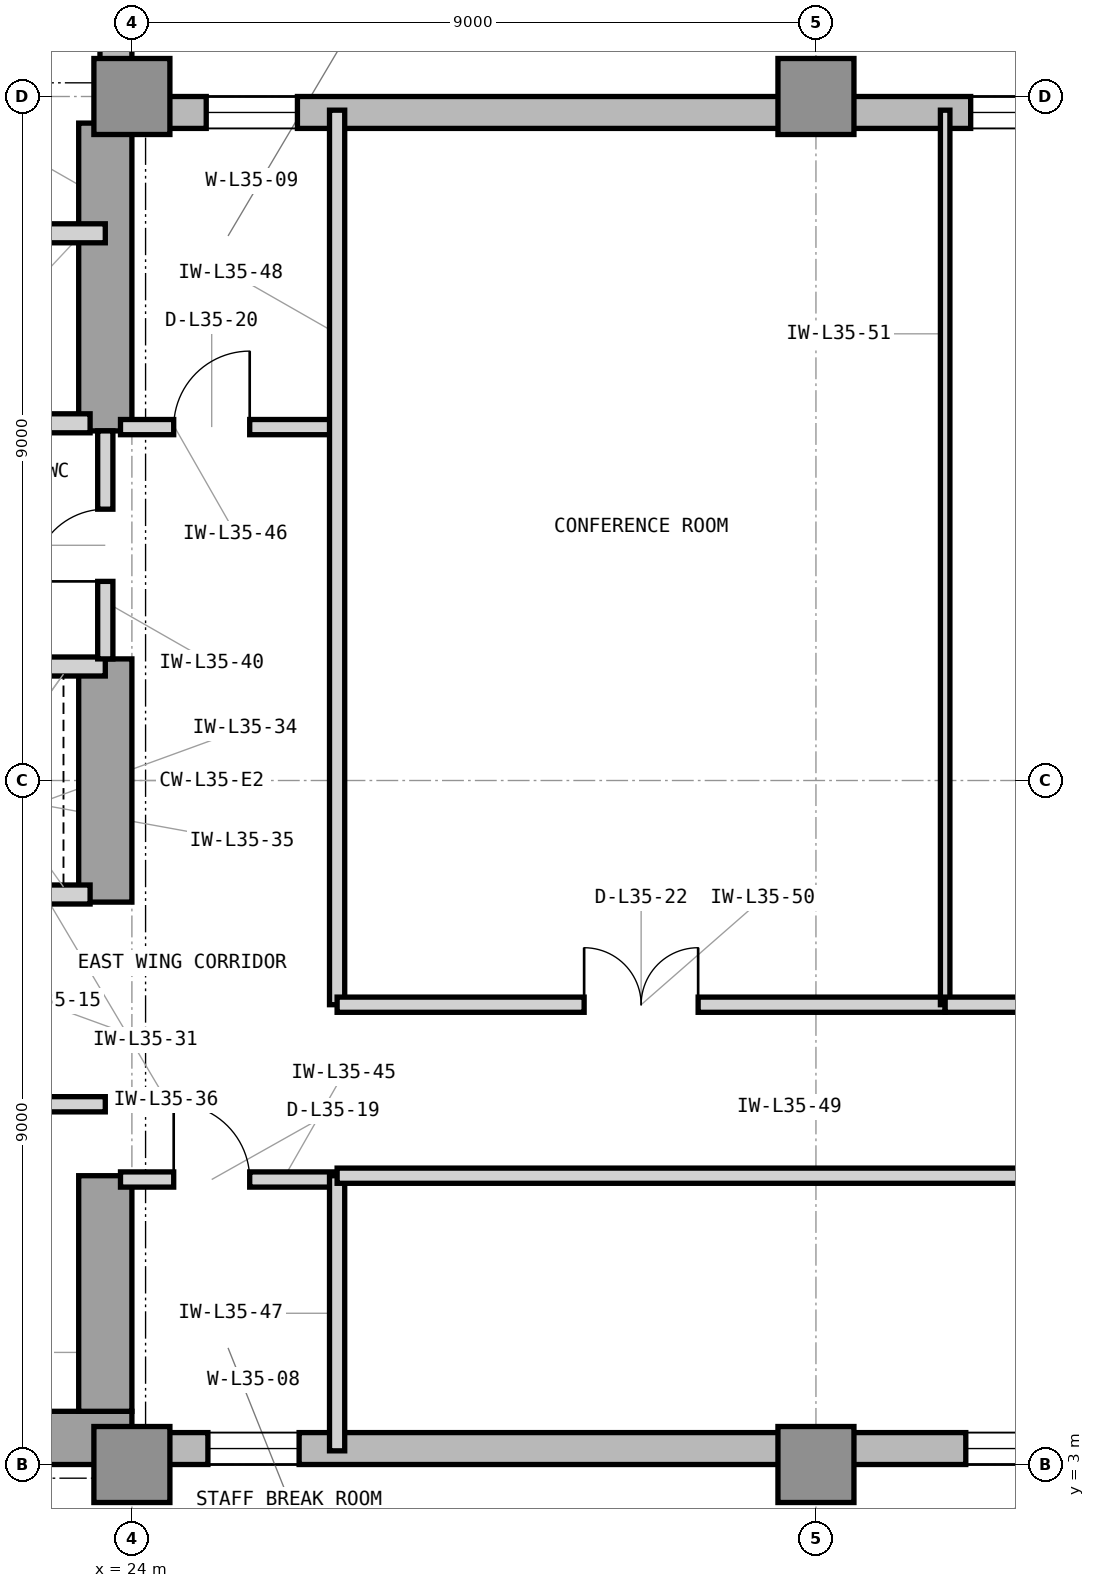
"""IFC4 building model, lengths in metres.
Left out: names, types, materials, properties, quantities, classifications, styles, units other than length and angle.
Written with IfcOpenShell. Run it as: python <this file> out.ifc"""

import sys

from ifc_helpers import new_model, si_unit, direction, frame, frame_2d, origin, origin_2d, place, context, subcontext, project, spatial, rectangle, extrude, element, fill, save


model = new_model("IFC4")
c1 = context("Model", 3, precision=1e-05, world=origin(), true_north=direction((0.0, 1.0)))
c2 = subcontext(c1, "Body", "Model", "MODEL_VIEW")
j1 = project(units=[si_unit("LENGTHUNIT", "METRE"), si_unit("PLANEANGLEUNIT", "RADIAN")], contexts=[c1])
p1 = place(None, origin())
s1 = spatial("IfcSite", under=j1, at=p1, CompositionType="ELEMENT")
p2 = place(p1, origin())
s2 = spatial("IfcBuilding", under=s1, at=p2, CompositionType="ELEMENT")
p3 = place(p2, frame((0.0, 0.0, 147.9)))
s3 = spatial("IfcBuildingStorey", under=s2, at=p3, CompositionType="ELEMENT", Elevation=147.9)
p4 = place(p3, frame((7.475, 3.35, 0.0), z_axis=(0.0, 0.0, 1.0), x_axis=(1.0, 0.0, 0.0)))
e1 = element("IfcWall", 1, at=p4, inside=s3, PredefinedType="SHEAR", context=c2, shape_type="SweptSolid", body=[
    extrude(rectangle(XDim=16.525, YDim=0.7, at=frame_2d((8.262, 0.0))), origin(), (0.0, 0.0, 1.0), 3.9),
])
p5 = place(p3, frame((23.65, 3.7, 0.0), z_axis=(0.0, 0.0, 1.0), x_axis=(0.0, 1.0, 0.0)))
e2 = element("IfcWall", 2, at=p5, inside=s3, PredefinedType="SHEAR", context=c2, shape_type="SweptSolid", body=[
    extrude(rectangle(XDim=3.1, YDim=0.7, at=frame_2d((1.55, 0.0))), origin(), (0.0, 0.0, 1.0), 3.9),
])
p6 = place(p3, frame((23.65, 10.4, 0.0), z_axis=(0.0, 0.0, 1.0), x_axis=(0.0, 1.0, 0.0)))
e3 = element("IfcWall", 3, at=p6, inside=s3, PredefinedType="SHEAR", context=c2, shape_type="SweptSolid", body=[
    extrude(rectangle(XDim=3.2, YDim=0.7, at=frame_2d((1.6, 0.0))), origin(), (0.0, 0.0, 1.0), 3.9),
])
p7 = place(p3, frame((23.65, 16.6, 0.0), z_axis=(0.0, 0.0, 1.0), x_axis=(0.0, 1.0, 0.0)))
e4 = element("IfcWall", 4, at=p7, inside=s3, PredefinedType="SHEAR", context=c2, shape_type="SweptSolid", body=[
    extrude(rectangle(XDim=4.05, YDim=0.7, at=frame_2d((2.025, 0.0))), origin(), (0.0, 0.0, 1.0), 3.9),
])
for number, where, z_axis, x_axis in (
    (5, (24.0, 3.0, 0.0), (0.0, 0.0, 1.0), (1.0, 0.0, 0.0)),
    (6, (24.0, 21.0, 0.0), (0.0, 0.0, 1.0), (1.0, 0.0, 0.0)),
    (7, (33.0, 3.0, 0.0), (0.0, 0.0, 1.0), (1.0, 0.0, 0.0)),
    (8, (33.0, 21.0, 0.0), (0.0, 0.0, 1.0), (1.0, 0.0, 0.0)),
):
    element("IfcColumn", number, at=place(p3, frame(where, z_axis=z_axis, x_axis=x_axis)), inside=s3, PredefinedType="COLUMN", context=c2, shape_type="SweptSolid", body=[
        extrude(rectangle(XDim=1.0, YDim=1.0, at=origin_2d()), origin(), (0.0, 0.0, 1.0), 3.9),
    ])
p8 = place(p3, frame((23.9, 3.21, 0.0), z_axis=(0.0, 0.0, 1.0), x_axis=(1.0, 0.0, 0.0)))
e9 = element("IfcWall", 9, at=p8, inside=s3, PredefinedType="STANDARD", context=c2, shape_type="SweptSolid", body=[
    extrude(rectangle(XDim=34.5, YDim=0.42, at=frame_2d((17.25, 0.0))), origin(), (0.0, 0.0, 1.0), 3.7),
])
p9 = place(p8, frame((11.071, 0.0, 0.85)))
e10 = element("IfcOpeningElement", 10, at=p9, cuts=e9, PredefinedType="OPENING", context=c2, shape_type="SweptSolid", body=[
    extrude(rectangle(XDim=2.5, YDim=2.25, at=frame_2d((1.25, 1.125))), frame((0.0, 0.22, 0.0), z_axis=(0.0, -1.0, 0.0), x_axis=(1.0, 0.0, 0.0)), (0.0, 0.0, 1.0), 0.44),
])
p10 = place(p8, frame((1.1, 0.0, 0.85)))
e11 = element("IfcOpeningElement", 11, at=p10, cuts=e9, PredefinedType="OPENING", context=c2, shape_type="SweptSolid", body=[
    extrude(rectangle(XDim=1.2, YDim=2.25, at=frame_2d((0.6, 1.125))), frame((0.0, 0.22, 0.0), z_axis=(0.0, -1.0, 0.0), x_axis=(1.0, 0.0, 0.0)), (0.0, 0.0, 1.0), 0.44),
])
p11 = place(p3, frame((58.4, 20.79, 0.0), z_axis=(0.0, 0.0, 1.0), x_axis=(-1.0, 0.0, 0.0)))
e12 = element("IfcWall", 12, at=p11, inside=s3, PredefinedType="STANDARD", context=c2, shape_type="SweptSolid", body=[
    extrude(rectangle(XDim=34.4, YDim=0.42, at=frame_2d((17.2, 0.0))), origin(), (0.0, 0.0, 1.0), 3.7),
])
p12 = place(p11, frame((20.864, 0.0, 0.85)))
e13 = element("IfcOpeningElement", 13, at=p12, cuts=e12, PredefinedType="OPENING", context=c2, shape_type="SweptSolid", body=[
    extrude(rectangle(XDim=2.5, YDim=2.25, at=frame_2d((1.25, 1.125))), frame((0.0, 0.22, 0.0), z_axis=(0.0, -1.0, 0.0), x_axis=(1.0, 0.0, 0.0)), (0.0, 0.0, 1.0), 0.44),
])
p13 = place(p11, frame((32.222, 0.0, 0.85)))
e14 = element("IfcOpeningElement", 14, at=p13, cuts=e12, PredefinedType="OPENING", context=c2, shape_type="SweptSolid", body=[
    extrude(rectangle(XDim=1.2, YDim=2.25, at=frame_2d((0.6, 1.125))), frame((0.0, 0.22, 0.0), z_axis=(0.0, -1.0, 0.0), x_axis=(1.0, 0.0, 0.0)), (0.0, 0.0, 1.0), 0.44),
])
p14 = place(p11, frame((11.386, 0.0, 0.85)))
e15 = element("IfcOpeningElement", 15, at=p14, cuts=e12, PredefinedType="OPENING", context=c2, shape_type="SweptSolid", body=[
    extrude(rectangle(XDim=2.5, YDim=2.25, at=frame_2d((1.25, 1.125))), frame((0.0, 0.22, 0.0), z_axis=(0.0, -1.0, 0.0), x_axis=(1.0, 0.0, 0.0)), (0.0, 0.0, 1.0), 0.44),
])
p15 = place(p3, frame((23.79, 21.0, 0.0), z_axis=(0.0, 0.0, 1.0), x_axis=(0.0, 1.0, 0.0)))
e16 = element("IfcWall", 16, at=p15, inside=s3, PredefinedType="STANDARD", context=c2, shape_type="SweptSolid", body=[
    extrude(rectangle(XDim=25.4, YDim=0.42, at=frame_2d((12.7, 0.0))), origin(), (0.0, 0.0, 1.0), 3.7),
])
p16 = place(p15, frame((11.45, 0.0, 0.85)))
e17 = element("IfcOpeningElement", 17, at=p16, cuts=e16, PredefinedType="OPENING", context=c2, shape_type="SweptSolid", body=[
    extrude(rectangle(XDim=2.5, YDim=2.25, at=frame_2d((1.25, 1.125))), frame((0.0, 0.22, 0.0), z_axis=(0.0, -1.0, 0.0), x_axis=(1.0, 0.0, 0.0)), (0.0, 0.0, 1.0), 0.44),
])
p17 = place(p15, frame((15.966, 0.0, 0.85)))
e18 = element("IfcOpeningElement", 18, at=p17, cuts=e16, PredefinedType="OPENING", context=c2, shape_type="SweptSolid", body=[
    extrude(rectangle(XDim=1.2, YDim=2.25, at=frame_2d((0.6, 1.125))), frame((0.0, 0.22, 0.0), z_axis=(0.0, -1.0, 0.0), x_axis=(1.0, 0.0, 0.0)), (0.0, 0.0, 1.0), 0.44),
])
p18 = place(p3, frame((21.05, 16.7, 0.0), z_axis=(0.0, 0.0, 1.0), x_axis=(1.0, 0.0, 0.0)))
e19 = element("IfcWall", 19, at=p18, inside=s3, PredefinedType="PARTITIONING", context=c2, shape_type="SweptSolid", body=[
    extrude(rectangle(XDim=2.4, YDim=0.25, at=frame_2d((1.2, 0.0))), origin(), (0.0, 0.0, 1.0), 3.233),
])
p19 = place(p3, frame((16.45, 19.2, 0.0), z_axis=(0.0, 0.0, 1.0), x_axis=(1.0, 0.0, 0.0)))
e20 = element("IfcWall", 20, at=p19, inside=s3, PredefinedType="PARTITIONING", context=c2, shape_type="SweptSolid", body=[
    extrude(rectangle(XDim=7.2, YDim=0.25, at=frame_2d((3.6, 0.0))), origin(), (0.0, 0.0, 1.0), 3.69),
])
p20 = place(p3, frame((17.5, 7.74, 0.0), z_axis=(0.0, 0.0, 1.0), x_axis=(1.0, 0.0, 0.0)))
e21 = element("IfcWall", 21, at=p20, inside=s3, PredefinedType="PARTITIONING", context=c2, shape_type="SweptSolid", body=[
    extrude(rectangle(XDim=6.15, YDim=0.2, at=frame_2d((3.075, 0.0))), origin(), (0.0, 0.0, 1.0), 3.69),
])
p21 = place(p20, frame((2.575, 0.0, 0.0)))
e22 = element("IfcOpeningElement", 22, at=p21, cuts=e21, PredefinedType="OPENING", context=c2, shape_type="SweptSolid", body=[
    extrude(rectangle(XDim=1.0, YDim=2.15, at=frame_2d((0.5, 1.075))), frame((0.0, 0.11, 0.0), z_axis=(0.0, -1.0, 0.0), x_axis=(1.0, 0.0, 0.0)), (0.0, 0.0, 1.0), 0.22),
])
p22 = place(p3, frame((21.05, 10.5, 0.0), z_axis=(0.0, 0.0, 1.0), x_axis=(1.0, 0.0, 0.0)))
e23 = element("IfcWall", 23, at=p22, inside=s3, PredefinedType="PARTITIONING", context=c2, shape_type="SweptSolid", body=[
    extrude(rectangle(XDim=2.4, YDim=0.25, at=frame_2d((1.2, 0.0))), origin(), (0.0, 0.0, 1.0), 3.233),
])
p23 = place(p22, frame((0.48, 0.0, 0.0)))
e24 = element("IfcOpeningElement", 24, at=p23, cuts=e23, PredefinedType="OPENING", context=c2, shape_type="SweptSolid", body=[
    extrude(rectangle(XDim=1.15, YDim=2.25, at=frame_2d((0.575, 1.125))), frame((0.0, 0.135, 0.0), z_axis=(0.0, -1.0, 0.0), x_axis=(1.0, 0.0, 0.0)), (0.0, 0.0, 1.0), 0.27),
])
p24 = place(p3, frame((14.7, 13.5, 0.0), z_axis=(0.0, 0.0, 1.0), x_axis=(1.0, 0.0, 0.0)))
e25 = element("IfcWall", 25, at=p24, inside=s3, PredefinedType="PARTITIONING", context=c2, shape_type="SweptSolid", body=[
    extrude(rectangle(XDim=8.95, YDim=0.25, at=frame_2d((4.475, 0.0))), origin(), (0.0, 0.0, 1.0), 3.233),
])
p25 = place(p3, frame((23.65, 13.6, 0.0), z_axis=(0.0, 0.0, 1.0), x_axis=(0.0, 1.0, 0.0)))
e26 = element("IfcWall", 26, at=p25, inside=s3, PredefinedType="PARTITIONING", context=c2, shape_type="SweptSolid", body=[
    extrude(rectangle(XDim=3.0, YDim=0.2, at=frame_2d((1.5, 0.0))), origin(), (0.0, 0.0, 1.0), 3.69),
])
p26 = place(p25, frame((1.02, 0.0, 0.0)))
e27 = element("IfcOpeningElement", 27, at=p26, cuts=e26, PredefinedType="OPENING", context=c2, shape_type="SweptSolid", body=[
    extrude(rectangle(XDim=0.95, YDim=2.1, at=frame_2d((0.475, 1.05))), frame((0.0, 0.11, 0.0), z_axis=(0.0, -1.0, 0.0), x_axis=(1.0, 0.0, 0.0)), (0.0, 0.0, 1.0), 0.22),
])
p27 = place(p3, frame((23.85, 6.75, 0.0), z_axis=(0.0, 0.0, 1.0), x_axis=(1.0, 0.0, 0.0)))
e28 = element("IfcWall", 28, at=p27, inside=s3, PredefinedType="PARTITIONING", context=c2, shape_type="SweptSolid", body=[
    extrude(rectangle(XDim=2.85, YDim=0.2, at=frame_2d((1.425, 0.0))), origin(), (0.0, 0.0, 1.0), 3.69),
])
p28 = place(p27, frame((0.7, 0.0, 0.0)))
e29 = element("IfcOpeningElement", 29, at=p28, cuts=e28, PredefinedType="OPENING", context=c2, shape_type="SweptSolid", body=[
    extrude(rectangle(XDim=1.0, YDim=2.15, at=frame_2d((0.5, 1.075))), frame((0.0, 0.11, 0.0), z_axis=(0.0, -1.0, 0.0), x_axis=(1.0, 0.0, 0.0)), (0.0, 0.0, 1.0), 0.22),
])
p29 = place(p3, frame((23.85, 16.65, 0.0), z_axis=(0.0, 0.0, 1.0), x_axis=(1.0, 0.0, 0.0)))
e30 = element("IfcWall", 30, at=p29, inside=s3, PredefinedType="PARTITIONING", context=c2, shape_type="SweptSolid", body=[
    extrude(rectangle(XDim=2.85, YDim=0.2, at=frame_2d((1.425, 0.0))), origin(), (0.0, 0.0, 1.0), 3.69),
])
p30 = place(p29, frame((0.7, 0.0, 0.0)))
e31 = element("IfcOpeningElement", 31, at=p30, cuts=e30, PredefinedType="OPENING", context=c2, shape_type="SweptSolid", body=[
    extrude(rectangle(XDim=1.0, YDim=2.15, at=frame_2d((0.5, 1.075))), frame((0.0, 0.11, 0.0), z_axis=(0.0, -1.0, 0.0), x_axis=(1.0, 0.0, 0.0)), (0.0, 0.0, 1.0), 0.22),
])
p31 = place(p3, frame((26.7, 3.18, 0.0), z_axis=(0.0, 0.0, 1.0), x_axis=(0.0, 1.0, 0.0)))
e32 = element("IfcWall", 32, at=p31, inside=s3, PredefinedType="PARTITIONING", context=c2, shape_type="SweptSolid", body=[
    extrude(rectangle(XDim=3.62, YDim=0.2, at=frame_2d((1.81, 0.0))), origin(), (0.0, 0.0, 1.0), 3.69),
])
p32 = place(p3, frame((26.7, 9.05, 0.0), z_axis=(0.0, 0.0, 1.0), x_axis=(0.0, 1.0, 0.0)))
e33 = element("IfcWall", 33, at=p32, inside=s3, PredefinedType="PARTITIONING", context=c2, shape_type="SweptSolid", body=[
    extrude(rectangle(XDim=11.77, YDim=0.2, at=frame_2d((5.885, 0.0))), origin(), (0.0, 0.0, 1.0), 3.69),
])
p33 = place(p3, frame((26.7, 6.8, 0.0), z_axis=(0.0, 0.0, 1.0), x_axis=(1.0, 0.0, 0.0)))
e34 = element("IfcWall", 34, at=p33, inside=s3, PredefinedType="PARTITIONING", context=c2, shape_type="SweptSolid", body=[
    extrude(rectangle(XDim=23.8, YDim=0.2, at=frame_2d((11.9, 0.0))), origin(), (0.0, 0.0, 1.0), 3.69),
])
p34 = place(p33, frame((11.4, 0.0, 0.0)))
e35 = element("IfcOpeningElement", 35, at=p34, cuts=e34, PredefinedType="OPENING", context=c2, shape_type="SweptSolid", body=[
    extrude(rectangle(XDim=1.0, YDim=2.15, at=frame_2d((0.5, 1.075))), frame((0.0, 0.11, 0.0), z_axis=(0.0, -1.0, 0.0), x_axis=(1.0, 0.0, 0.0)), (0.0, 0.0, 1.0), 0.22),
])
p35 = place(p3, frame((26.7, 9.05, 0.0), z_axis=(0.0, 0.0, 1.0), x_axis=(1.0, 0.0, 0.0)))
e36 = element("IfcWall", 36, at=p35, inside=s3, PredefinedType="PARTITIONING", context=c2, shape_type="SweptSolid", body=[
    extrude(rectangle(XDim=8.0, YDim=0.2, at=frame_2d((4.0, 0.0))), origin(), (0.0, 0.0, 1.0), 3.233),
])
p36 = place(p35, frame((3.25, 0.0, 0.0)))
e37 = element("IfcOpeningElement", 37, at=p36, cuts=e36, PredefinedType="OPENING", context=c2, shape_type="SweptSolid", body=[
    extrude(rectangle(XDim=1.5, YDim=2.3, at=frame_2d((0.75, 1.15))), frame((0.0, 0.11, 0.0), z_axis=(0.0, -1.0, 0.0), x_axis=(1.0, 0.0, 0.0)), (0.0, 0.0, 1.0), 0.22),
])
p37 = place(p3, frame((34.7, 9.05, 0.0), z_axis=(0.0, 0.0, 1.0), x_axis=(0.0, 1.0, 0.0)))
e38 = element("IfcWall", 38, at=p37, inside=s3, PredefinedType="PARTITIONING", context=c2, shape_type="SweptSolid", body=[
    extrude(rectangle(XDim=11.77, YDim=0.125, at=frame_2d((5.885, 0.0))), origin(), (0.0, 0.0, 1.0), 3.69),
])
p38 = place(p3, frame((34.7, 9.05, 0.0), z_axis=(0.0, 0.0, 1.0), x_axis=(1.0, 0.0, 0.0)))
e39 = element("IfcWall", 39, at=p38, inside=s3, PredefinedType="PARTITIONING", context=c2, shape_type="SweptSolid", body=[
    extrude(rectangle(XDim=8.5, YDim=0.2, at=frame_2d((4.25, 0.0))), origin(), (0.0, 0.0, 1.0), 3.233),
])
p39 = place(p38, frame((3.75, 0.0, 0.0)))
e40 = element("IfcOpeningElement", 40, at=p39, cuts=e39, PredefinedType="OPENING", context=c2, shape_type="SweptSolid", body=[
    extrude(rectangle(XDim=1.0, YDim=2.15, at=frame_2d((0.5, 1.075))), frame((0.0, 0.11, 0.0), z_axis=(0.0, -1.0, 0.0), x_axis=(1.0, 0.0, 0.0)), (0.0, 0.0, 1.0), 0.22),
])
p40 = place(p9, origin())
e41 = element("IfcWindow", 41, at=p40, inside=s3, PartitioningType="SINGLE_PANEL", PredefinedType="WINDOW", context=c2, shape_type="SweptSolid", body=[
    extrude(rectangle(XDim=2.5, YDim=2.25, at=frame_2d((1.25, 1.125))), frame((0.0, 0.11, 0.0), z_axis=(0.0, -1.0, 0.0), x_axis=(1.0, 0.0, 0.0)), (0.0, 0.0, 1.0), 0.06),
])
fill(e10, e41)
p41 = place(p12, origin())
e42 = element("IfcWindow", 42, at=p41, inside=s3, PartitioningType="SINGLE_PANEL", PredefinedType="WINDOW", context=c2, shape_type="SweptSolid", body=[
    extrude(rectangle(XDim=2.5, YDim=2.25, at=frame_2d((1.25, 1.125))), frame((0.0, 0.11, 0.0), z_axis=(0.0, -1.0, 0.0), x_axis=(1.0, 0.0, 0.0)), (0.0, 0.0, 1.0), 0.06),
])
fill(e13, e42)
p42 = place(p26, origin())
e43 = element("IfcDoor", 43, at=p42, inside=s3, OperationType="SINGLE_SWING_LEFT", PredefinedType="DOOR", context=c2, shape_type="SweptSolid", body=[
    extrude(rectangle(XDim=0.95, YDim=2.1, at=frame_2d((0.475, 1.05))), frame((0.0, 0.025, 0.0), z_axis=(0.0, -1.0, 0.0), x_axis=(1.0, 0.0, 0.0)), (0.0, 0.0, 1.0), 0.05),
])
fill(e27, e43)
p43 = place(p28, origin())
e44 = element("IfcDoor", 44, at=p43, inside=s3, OperationType="SINGLE_SWING_LEFT", PredefinedType="DOOR", context=c2, shape_type="SweptSolid", body=[
    extrude(rectangle(XDim=1.0, YDim=2.15, at=frame_2d((0.5, 1.075))), frame((0.0, 0.025, 0.0), z_axis=(0.0, -1.0, 0.0), x_axis=(1.0, 0.0, 0.0)), (0.0, 0.0, 1.0), 0.05),
])
fill(e29, e44)
p44 = place(p30, origin())
e45 = element("IfcDoor", 45, at=p44, inside=s3, OperationType="SINGLE_SWING_RIGHT", PredefinedType="DOOR", context=c2, shape_type="SweptSolid", body=[
    extrude(rectangle(XDim=1.0, YDim=2.15, at=frame_2d((0.5, 1.075))), frame((0.0, 0.025, 0.0), z_axis=(0.0, -1.0, 0.0), x_axis=(1.0, 0.0, 0.0)), (0.0, 0.0, 1.0), 0.05),
])
fill(e31, e45)
p45 = place(p36, origin())
e46 = element("IfcDoor", 46, at=p45, inside=s3, OperationType="DOUBLE_DOOR_SINGLE_SWING", PredefinedType="DOOR", context=c2, shape_type="SweptSolid", body=[
    extrude(rectangle(XDim=1.5, YDim=2.3, at=frame_2d((0.75, 1.15))), frame((0.0, 0.025, 0.0), z_axis=(0.0, -1.0, 0.0), x_axis=(1.0, 0.0, 0.0)), (0.0, 0.0, 1.0), 0.05),
])
fill(e37, e46)
p46 = place(p10, origin())
e47 = element("IfcWindow", 47, at=p46, inside=s3, PartitioningType="SINGLE_PANEL", PredefinedType="WINDOW", context=c2, shape_type="SweptSolid", body=[
    extrude(rectangle(XDim=1.2, YDim=2.25, at=frame_2d((0.6, 1.125))), frame((0.0, 0.11, 0.0), z_axis=(0.0, -1.0, 0.0), x_axis=(1.0, 0.0, 0.0)), (0.0, 0.0, 1.0), 0.06),
])
fill(e11, e47)
p47 = place(p13, origin())
e48 = element("IfcWindow", 48, at=p47, inside=s3, PartitioningType="SINGLE_PANEL", PredefinedType="WINDOW", context=c2, shape_type="SweptSolid", body=[
    extrude(rectangle(XDim=1.2, YDim=2.25, at=frame_2d((0.6, 1.125))), frame((0.0, 0.11, 0.0), z_axis=(0.0, -1.0, 0.0), x_axis=(1.0, 0.0, 0.0)), (0.0, 0.0, 1.0), 0.06),
])
fill(e14, e48)
save(model, sys.argv[1])
